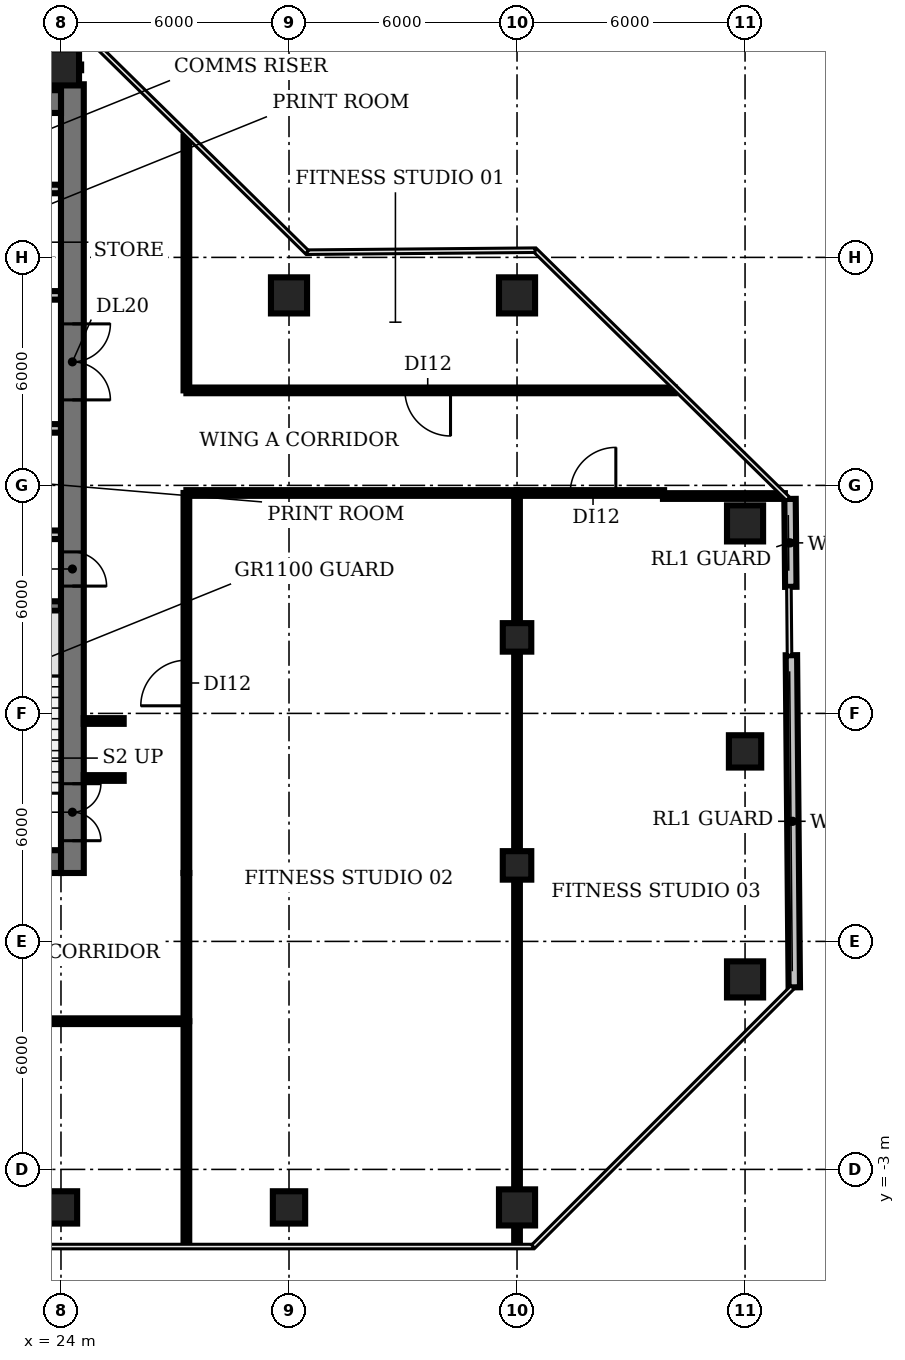
"""IFC4 building model, lengths in metres.
Left out: names, types, materials, properties, quantities, classifications, styles, units other than length and angle.
Written with IfcOpenShell. Run it as: python <this file> out.ifc"""

import sys

from ifc_helpers import new_model, si_unit, direction, frame, frame_2d, origin, origin_2d, place, context, subcontext, project, spatial, rectangle, circle, extrude, element, fill, save


model = new_model("IFC4")
c1 = context("Model", 3, precision=1e-05, world=origin(), true_north=direction((0.0, 1.0)))
c2 = subcontext(c1, "Body", "Model", "MODEL_VIEW")
j1 = project(units=[si_unit("LENGTHUNIT", "METRE"), si_unit("PLANEANGLEUNIT", "RADIAN")], contexts=[c1])
p1 = place(None, origin())
s1 = spatial("IfcSite", under=j1, at=p1, CompositionType="ELEMENT")
p2 = place(p1, origin())
s2 = spatial("IfcBuilding", under=s1, at=p2, CompositionType="ELEMENT")
p3 = place(p2, frame((0.0, 0.0, 171.8)))
s3 = spatial("IfcBuildingStorey", under=s2, at=p3, CompositionType="ELEMENT", Elevation=171.8)
p4 = place(p3, frame((24.0, -4.0, 0.0), z_axis=(0.0, 0.0, 1.0), x_axis=(1.0, 0.0, 0.0)))
e1 = element("IfcColumn", 1, at=p4, inside=s3, PredefinedType="COLUMN", context=c2, shape_type="SweptSolid", body=[
    extrude(rectangle(XDim=0.85, YDim=0.85, at=origin_2d()), origin(), (0.0, 0.0, 1.0), 3.85),
])
p5 = place(p3, frame((24.0, 26.0, 0.0), z_axis=(0.0, 0.0, 1.0), x_axis=(1.0, 0.0, 0.0)))
e2 = element("IfcColumn", 2, at=p5, inside=s3, PredefinedType="COLUMN", context=c2, shape_type="SweptSolid", body=[
    extrude(circle(Radius=0.475, at=origin_2d()), origin(), (0.0, 0.0, 1.0), 3.85),
])
p6 = place(p3, frame((30.0, -4.0, 0.0), z_axis=(0.0, 0.0, 1.0), x_axis=(1.0, 0.0, 0.0)))
e3 = element("IfcColumn", 3, at=p6, inside=s3, PredefinedType="COLUMN", context=c2, shape_type="SweptSolid", body=[
    extrude(rectangle(XDim=0.85, YDim=0.85, at=origin_2d()), origin(), (0.0, 0.0, 1.0), 3.85),
])
for number, where, z_axis, x_axis in (
    (4, (30.0, 20.0, 0.0), (0.0, 0.0, 1.0), (1.0, 0.0, 0.0)),
    (5, (36.0, -4.0, 0.0), (0.0, 0.0, 1.0), (1.0, 0.0, 0.0)),
):
    element("IfcColumn", number, at=place(p3, frame(where, z_axis=z_axis, x_axis=x_axis)), inside=s3, PredefinedType="COLUMN", context=c2, shape_type="SweptSolid", body=[
        extrude(circle(Radius=0.475, at=origin_2d()), origin(), (0.0, 0.0, 1.0), 3.85),
    ])
for number, where, z_axis, x_axis in (
    (6, (36.0, 5.0, 0.0), (0.0, 0.0, 1.0), (1.0, 0.0, 0.0)),
    (7, (36.0, 11.0, 0.0), (0.0, 0.0, 1.0), (1.0, 0.0, 0.0)),
):
    element("IfcColumn", number, at=place(p3, frame(where, z_axis=z_axis, x_axis=x_axis)), inside=s3, PredefinedType="COLUMN", context=c2, shape_type="SweptSolid", body=[
        extrude(rectangle(XDim=0.75, YDim=0.75, at=origin_2d()), origin(), (0.0, 0.0, 1.0), 3.85),
    ])
for number, where, z_axis, x_axis in (
    (8, (36.0, 20.0, 0.0), (0.0, 0.0, 1.0), (1.0, 0.0, 0.0)),
    (9, (42.0, 2.0, 0.0), (0.0, 0.0, 1.0), (1.0, 0.0, 0.0)),
):
    element("IfcColumn", number, at=place(p3, frame(where, z_axis=z_axis, x_axis=x_axis)), inside=s3, PredefinedType="COLUMN", context=c2, shape_type="SweptSolid", body=[
        extrude(circle(Radius=0.475, at=origin_2d()), origin(), (0.0, 0.0, 1.0), 3.85),
    ])
p7 = place(p3, frame((42.0, 8.0, 0.0), z_axis=(0.0, 0.0, 1.0), x_axis=(1.0, 0.0, 0.0)))
e10 = element("IfcColumn", 10, at=p7, inside=s3, PredefinedType="COLUMN", context=c2, shape_type="SweptSolid", body=[
    extrude(rectangle(XDim=0.85, YDim=0.85, at=origin_2d()), origin(), (0.0, 0.0, 1.0), 3.85),
])
p8 = place(p3, frame((42.0, 14.0, 0.0), z_axis=(0.0, 0.0, 1.0), x_axis=(1.0, 0.0, 0.0)))
e11 = element("IfcColumn", 11, at=p8, inside=s3, PredefinedType="COLUMN", context=c2, shape_type="SweptSolid", body=[
    extrude(circle(Radius=0.475, at=origin_2d()), origin(), (0.0, 0.0, 1.0), 3.85),
])
p9 = place(p3, frame((43.296, 1.791, 0.0), z_axis=(0.0, 0.0, 1.0), x_axis=(-0.008742926817, 0.999961779885, 0.0)))
e12 = element("IfcWall", 12, at=p9, inside=s3, PredefinedType="SOLIDWALL", context=c2, shape_type="SweptSolid", body=[
    extrude(rectangle(XDim=8.74, YDim=0.3, at=frame_2d((4.37, 0.0))), origin(), (0.0, 0.0, 1.0), 3.85),
])
p10 = place(p3, frame((43.204, 12.331, 0.0), z_axis=(0.0, 0.0, 1.0), x_axis=(-0.00875955838, 0.999961634333, 0.0)))
e13 = element("IfcWall", 13, at=p10, inside=s3, PredefinedType="SOLIDWALL", context=c2, shape_type="SweptSolid", body=[
    extrude(rectangle(XDim=2.313, YDim=0.3, at=frame_2d((1.157, 0.0))), origin(), (0.0, 0.0, 1.0), 3.85),
])
p11 = place(p3, frame((20.85, 11.825, 0.0), z_axis=(0.0, 0.0, 1.0), x_axis=(1.0, 0.0, 0.0)))
e14 = element("IfcWall", 14, at=p11, inside=s3, PredefinedType="SHEAR", context=c2, shape_type="SweptSolid", body=[
    extrude(rectangle(XDim=3.15, YDim=0.25, at=frame_2d((1.575, 0.0))), origin(), (0.0, 0.0, 1.0), 3.85),
])
p12 = place(p3, frame((16.6, 13.7, 0.0), z_axis=(0.0, 0.0, 1.0), x_axis=(1.0, 0.0, 0.0)))
e15 = element("IfcWall", 15, at=p12, inside=s3, PredefinedType="PARTITIONING", context=c2, shape_type="SweptSolid", body=[
    extrude(rectangle(XDim=7.4, YDim=0.225, at=frame_2d((3.7, 0.0))), origin(), (0.0, 0.0, 1.0), 3.85),
])
p13 = place(p3, frame((9.4, 16.5, 0.0), z_axis=(0.0, 0.0, 1.0), x_axis=(1.0, 0.0, 0.0)))
e16 = element("IfcWall", 16, at=p13, inside=s3, PredefinedType="PARTITIONING", context=c2, shape_type="SweptSolid", body=[
    extrude(rectangle(XDim=14.6, YDim=0.225, at=frame_2d((7.3, 0.0))), origin(), (0.0, 0.0, 1.0), 3.85),
])
p14 = place(p13, frame((0.55, 0.0, 0.0)))
e17 = element("IfcOpeningElement", 17, at=p14, cuts=e16, PredefinedType="OPENING", context=c2, shape_type="SweptSolid", body=[
    extrude(rectangle(XDim=0.9, YDim=2.1, at=frame_2d((0.45, 1.05))), frame((0.0, 0.123, 0.0), z_axis=(0.0, -1.0, 0.0), x_axis=(1.0, 0.0, 0.0)), (0.0, 0.0, 1.0), 0.245),
])
p15 = place(p13, frame((6.075, 0.0, 0.0)))
e18 = element("IfcOpeningElement", 18, at=p15, cuts=e16, PredefinedType="OPENING", context=c2, shape_type="SweptSolid", body=[
    extrude(rectangle(XDim=1.0, YDim=2.1, at=frame_2d((0.5, 1.05))), frame((0.0, 0.123, 0.0), z_axis=(0.0, -1.0, 0.0), x_axis=(1.0, 0.0, 0.0)), (0.0, 0.0, 1.0), 0.245),
])
p16 = place(p13, frame((11.308, 0.0, 0.0)))
e19 = element("IfcOpeningElement", 19, at=p16, cuts=e16, PredefinedType="OPENING", context=c2, shape_type="SweptSolid", body=[
    extrude(rectangle(XDim=0.9, YDim=2.1, at=frame_2d((0.45, 1.05))), frame((0.0, 0.123, 0.0), z_axis=(0.0, -1.0, 0.0), x_axis=(1.0, 0.0, 0.0)), (0.0, 0.0, 1.0), 0.245),
])
p17 = place(p13, frame((13.083, 0.0, 0.0)))
e20 = element("IfcOpeningElement", 20, at=p17, cuts=e16, PredefinedType="OPENING", context=c2, shape_type="SweptSolid", body=[
    extrude(rectangle(XDim=0.9, YDim=2.1, at=frame_2d((0.45, 1.05))), frame((0.0, 0.123, 0.0), z_axis=(0.0, -1.0, 0.0), x_axis=(1.0, 0.0, 0.0)), (0.0, 0.0, 1.0), 0.245),
])
p18 = place(p3, frame((24.0, 20.0, 0.0), z_axis=(0.0, 0.0, 1.0), x_axis=(-1.0, 0.0, 0.0)))
e21 = element("IfcWall", 21, at=p18, inside=s3, PredefinedType="PARTITIONING", context=c2, shape_type="SweptSolid", body=[
    extrude(rectangle(XDim=14.6, YDim=0.225, at=frame_2d((7.3, 0.0))), origin(), (0.0, 0.0, 1.0), 3.85),
])
p19 = place(p18, frame((12.75, 0.0, 0.0)))
e22 = element("IfcOpeningElement", 22, at=p19, cuts=e21, PredefinedType="OPENING", context=c2, shape_type="SweptSolid", body=[
    extrude(rectangle(XDim=1.1, YDim=2.1, at=frame_2d((0.55, 1.05))), frame((0.0, 0.123, 0.0), z_axis=(0.0, -1.0, 0.0), x_axis=(1.0, 0.0, 0.0)), (0.0, 0.0, 1.0), 0.245),
])
p20 = place(p18, frame((9.95, 0.0, 0.0)))
e23 = element("IfcOpeningElement", 23, at=p20, cuts=e21, PredefinedType="OPENING", context=c2, shape_type="SweptSolid", body=[
    extrude(rectangle(XDim=1.1, YDim=2.1, at=frame_2d((0.55, 1.05))), frame((0.0, 0.123, 0.0), z_axis=(0.0, -1.0, 0.0), x_axis=(1.0, 0.0, 0.0)), (0.0, 0.0, 1.0), 0.245),
])
p21 = place(p18, frame((7.15, 0.0, 0.0)))
e24 = element("IfcOpeningElement", 24, at=p21, cuts=e21, PredefinedType="OPENING", context=c2, shape_type="SweptSolid", body=[
    extrude(rectangle(XDim=1.1, YDim=2.1, at=frame_2d((0.55, 1.05))), frame((0.0, 0.123, 0.0), z_axis=(0.0, -1.0, 0.0), x_axis=(1.0, 0.0, 0.0)), (0.0, 0.0, 1.0), 0.245),
])
p22 = place(p18, frame((4.35, 0.0, 0.0)))
e25 = element("IfcOpeningElement", 25, at=p22, cuts=e21, PredefinedType="OPENING", context=c2, shape_type="SweptSolid", body=[
    extrude(rectangle(XDim=1.1, YDim=2.1, at=frame_2d((0.55, 1.05))), frame((0.0, 0.123, 0.0), z_axis=(0.0, -1.0, 0.0), x_axis=(1.0, 0.0, 0.0)), (0.0, 0.0, 1.0), 0.245),
])
p23 = place(p18, frame((2.308, 0.0, 0.0)))
e26 = element("IfcOpeningElement", 26, at=p23, cuts=e21, PredefinedType="OPENING", context=c2, shape_type="SweptSolid", body=[
    extrude(rectangle(XDim=0.9, YDim=2.1, at=frame_2d((0.45, 1.05))), frame((0.0, 0.123, 0.0), z_axis=(0.0, -1.0, 0.0), x_axis=(1.0, 0.0, 0.0)), (0.0, 0.0, 1.0), 0.245),
])
p24 = place(p18, frame((0.532, 0.0, 0.0)))
e27 = element("IfcOpeningElement", 27, at=p24, cuts=e21, PredefinedType="OPENING", context=c2, shape_type="SweptSolid", body=[
    extrude(rectangle(XDim=0.9, YDim=2.1, at=frame_2d((0.45, 1.05))), frame((0.0, 0.123, 0.0), z_axis=(0.0, -1.0, 0.0), x_axis=(1.0, 0.0, 0.0)), (0.0, 0.0, 1.0), 0.245),
])
p25 = place(p3, frame((9.4, 22.8, 0.0), z_axis=(0.0, 0.0, 1.0), x_axis=(1.0, 0.0, 0.0)))
e28 = element("IfcWall", 28, at=p25, inside=s3, PredefinedType="PARTITIONING", context=c2, shape_type="SweptSolid", body=[
    extrude(rectangle(XDim=14.6, YDim=0.225, at=frame_2d((7.3, 0.0))), origin(), (0.0, 0.0, 1.0), 3.85),
])
p26 = place(p3, frame((24.3, 25.555, 0.0), z_axis=(0.0, 0.0, 1.0), x_axis=(0.0, -1.0, 0.0)))
e29 = element("IfcWall", 29, at=p26, inside=s3, PredefinedType="SHEAR", context=c2, shape_type="SweptSolid", body=[
    extrude(rectangle(XDim=20.755, YDim=0.6, at=frame_2d((10.377, 0.0))), origin(), (0.0, 0.0, 1.0), 3.85),
])
p27 = place(p26, frame((18.405, 0.0, 0.0)))
e30 = element("IfcOpeningElement", 30, at=p27, cuts=e29, PredefinedType="OPENING", context=c2, shape_type="SweptSolid", body=[
    extrude(rectangle(XDim=1.5, YDim=2.1, at=frame_2d((0.75, 1.05))), frame((0.0, 0.31, 0.0), z_axis=(0.0, -1.0, 0.0), x_axis=(1.0, 0.0, 0.0)), (0.0, 0.0, 1.0), 0.62),
])
p28 = place(p26, frame((12.305, 0.0, 0.0)))
e31 = element("IfcOpeningElement", 31, at=p28, cuts=e29, PredefinedType="OPENING", context=c2, shape_type="SweptSolid", body=[
    extrude(rectangle(XDim=0.9, YDim=2.1, at=frame_2d((0.45, 1.05))), frame((0.0, 0.31, 0.0), z_axis=(0.0, -1.0, 0.0), x_axis=(1.0, 0.0, 0.0)), (0.0, 0.0, 1.0), 0.62),
])
p29 = place(p26, frame((6.305, 0.0, 0.0)))
e32 = element("IfcOpeningElement", 32, at=p29, cuts=e29, PredefinedType="OPENING", context=c2, shape_type="SweptSolid", body=[
    extrude(rectangle(XDim=2.0, YDim=2.1, at=frame_2d((1.0, 1.05))), frame((0.0, 0.31, 0.0), z_axis=(0.0, -1.0, 0.0), x_axis=(1.0, 0.0, 0.0)), (0.0, 0.0, 1.0), 0.62),
])
p30 = place(p3, frame((24.0, 5.1, 0.0), z_axis=(0.0, 0.0, 1.0), x_axis=(-1.0, 0.0, 0.0)))
e33 = element("IfcWall", 33, at=p30, inside=s3, PredefinedType="SHEAR", context=c2, shape_type="SweptSolid", body=[
    extrude(rectangle(XDim=18.0, YDim=0.6, at=frame_2d((9.0, 0.0))), origin(), (0.0, 0.0, 1.0), 3.85),
])
p31 = place(p30, frame((13.0, 0.0, 0.0)))
e34 = element("IfcOpeningElement", 34, at=p31, cuts=e33, PredefinedType="OPENING", context=c2, shape_type="SweptSolid", body=[
    extrude(rectangle(XDim=1.2, YDim=2.1, at=frame_2d((0.6, 1.05))), frame((0.0, 0.31, 0.0), z_axis=(0.0, -1.0, 0.0), x_axis=(1.0, 0.0, 0.0)), (0.0, 0.0, 1.0), 0.62),
])
p32 = place(p30, frame((4.9, 0.0, 0.0)))
e35 = element("IfcOpeningElement", 35, at=p32, cuts=e33, PredefinedType="OPENING", context=c2, shape_type="SweptSolid", body=[
    extrude(rectangle(XDim=1.0, YDim=2.1, at=frame_2d((0.5, 1.05))), frame((0.0, 0.31, 0.0), z_axis=(0.0, -1.0, 0.0), x_axis=(1.0, 0.0, 0.0)), (0.0, 0.0, 1.0), 0.62),
])
p33 = place(p3, frame((6.0, 25.1, 0.0), z_axis=(0.0, 0.0, 1.0), x_axis=(1.0, 0.0, 0.0)))
e36 = element("IfcWall", 36, at=p33, inside=s3, PredefinedType="SHEAR", context=c2, shape_type="SweptSolid", body=[
    extrude(rectangle(XDim=18.0, YDim=0.6, at=frame_2d((9.0, 0.0))), origin(), (0.0, 0.0, 1.0), 3.85),
])
p34 = place(p3, frame((23.48, 26.0, 0.0), z_axis=(0.0, 0.0, 1.0), x_axis=(1.0, 0.0, 0.0)))
e37 = element("IfcWall", 37, at=p34, inside=s3, PredefinedType="PARTITIONING", context=c2, shape_type="SweptSolid", body=[
    extrude(rectangle(XDim=1.05, YDim=0.15, at=frame_2d((0.525, 0.0))), origin(), (0.0, 0.0, 1.0), 2.88),
])
for number, where, z_axis, x_axis in (
    (38, (24.6, 7.3, 0.0), (0.0, 0.0, 1.0), (1.0, 0.0, 0.0)),
    (39, (24.6, 8.8, 0.0), (0.0, 0.0, 1.0), (1.0, 0.0, 0.0)),
):
    element("IfcWall", number, at=place(p3, frame(where, z_axis=z_axis, x_axis=x_axis)), inside=s3, PredefinedType="PARTITIONING", context=c2, shape_type="SweptSolid", body=[
        extrude(rectangle(XDim=1.05, YDim=0.15, at=frame_2d((0.525, 0.0))), origin(), (0.0, 0.0, 1.0), 2.88),
    ])
p35 = place(p3, frame((27.3, -4.98, 0.0), z_axis=(0.0, 0.0, 1.0), x_axis=(0.0, 1.0, 0.0)))
e40 = element("IfcWall", 40, at=p35, inside=s3, PredefinedType="PARTITIONING", context=c2, shape_type="SweptSolid", body=[
    extrude(rectangle(XDim=5.88, YDim=0.15, at=frame_2d((2.94, 0.0))), origin(), (0.0, 0.0, 1.0), 2.88),
])
p36 = place(p3, frame((27.3, 0.9, 0.0), z_axis=(0.0, 0.0, 1.0), x_axis=(-1.0, 0.0, 0.0)))
e41 = element("IfcWall", 41, at=p36, inside=s3, PredefinedType="PARTITIONING", context=c2, shape_type="SweptSolid", body=[
    extrude(rectangle(XDim=24.6, YDim=0.15, at=frame_2d((12.3, 0.0))), origin(), (0.0, 0.0, 1.0), 2.88),
])
p37 = place(p36, frame((11.8, 0.0, 0.0)))
e42 = element("IfcOpeningElement", 42, at=p37, cuts=e41, PredefinedType="OPENING", context=c2, shape_type="SweptSolid", body=[
    extrude(rectangle(XDim=1.2, YDim=2.1, at=frame_2d((0.6, 1.05))), frame((0.0, 0.085, 0.0), z_axis=(0.0, -1.0, 0.0), x_axis=(1.0, 0.0, 0.0)), (0.0, 0.0, 1.0), 0.17),
])
p38 = place(p3, frame((27.3, 0.9, 0.0), z_axis=(0.0, 0.0, 1.0), x_axis=(0.0, 1.0, 0.0)))
e43 = element("IfcWall", 43, at=p38, inside=s3, PredefinedType="PARTITIONING", context=c2, shape_type="SweptSolid", body=[
    extrude(rectangle(XDim=3.9, YDim=0.15, at=frame_2d((1.95, 0.0))), origin(), (0.0, 0.0, 1.0), 2.88),
])
p39 = place(p3, frame((27.3, 4.8, 0.0), z_axis=(0.0, 0.0, 1.0), x_axis=(0.0, 1.0, 0.0)))
e44 = element("IfcWall", 44, at=p39, inside=s3, PredefinedType="PARTITIONING", context=c2, shape_type="SweptSolid", body=[
    extrude(rectangle(XDim=10.0, YDim=0.15, at=frame_2d((5.0, 0.0))), origin(), (0.0, 0.0, 1.0), 2.88),
])
p40 = place(p39, frame((4.4, 0.0, 0.0)))
e45 = element("IfcOpeningElement", 45, at=p40, cuts=e44, PredefinedType="OPENING", context=c2, shape_type="SweptSolid", body=[
    extrude(rectangle(XDim=1.2, YDim=2.1, at=frame_2d((0.6, 1.05))), frame((0.0, 0.085, 0.0), z_axis=(0.0, -1.0, 0.0), x_axis=(1.0, 0.0, 0.0)), (0.0, 0.0, 1.0), 0.17),
])
p41 = place(p3, frame((27.3, 14.8, 0.0), z_axis=(0.0, 0.0, 1.0), x_axis=(1.0, 0.0, 0.0)))
e46 = element("IfcWall", 46, at=p41, inside=s3, PredefinedType="PARTITIONING", context=c2, shape_type="SweptSolid", body=[
    extrude(rectangle(XDim=8.7, YDim=0.15, at=frame_2d((4.35, 0.0))), origin(), (0.0, 0.0, 1.0), 2.88),
])
p42 = place(p3, frame((27.3, 17.5, 0.0), z_axis=(0.0, 0.0, 1.0), x_axis=(0.0, 1.0, 0.0)))
e47 = element("IfcWall", 47, at=p42, inside=s3, PredefinedType="PARTITIONING", context=c2, shape_type="SweptSolid", body=[
    extrude(rectangle(XDim=6.68, YDim=0.15, at=frame_2d((3.34, 0.0))), origin(), (0.0, 0.0, 1.0), 2.88),
])
p43 = place(p3, frame((36.0, -4.98, 0.0), z_axis=(0.0, 0.0, 1.0), x_axis=(0.0, 1.0, 0.0)))
e48 = element("IfcWall", 48, at=p43, inside=s3, PredefinedType="PARTITIONING", context=c2, shape_type="SweptSolid", body=[
    extrude(rectangle(XDim=19.78, YDim=0.15, at=frame_2d((9.89, 0.0))), origin(), (0.0, 0.0, 1.0), 2.88),
])
p44 = place(p3, frame((36.0, 14.8, 0.0), z_axis=(0.0, 0.0, 1.0), x_axis=(1.0, 0.0, 0.0)))
e49 = element("IfcWall", 49, at=p44, inside=s3, PredefinedType="PARTITIONING", context=c2, shape_type="SweptSolid", body=[
    extrude(rectangle(XDim=3.87, YDim=0.15, at=frame_2d((1.935, 0.0))), origin(), (0.0, 0.0, 1.0), 2.88),
])
p45 = place(p44, frame((1.4, 0.0, 0.0)))
e50 = element("IfcOpeningElement", 50, at=p45, cuts=e49, PredefinedType="OPENING", context=c2, shape_type="SweptSolid", body=[
    extrude(rectangle(XDim=1.2, YDim=2.1, at=frame_2d((0.6, 1.05))), frame((0.0, 0.085, 0.0), z_axis=(0.0, -1.0, 0.0), x_axis=(1.0, 0.0, 0.0)), (0.0, 0.0, 1.0), 0.17),
])
p46 = place(p3, frame((39.84, 14.72, 0.0), z_axis=(0.0, 0.0, 1.0), x_axis=(1.0, 0.0, 0.0)))
e51 = element("IfcWall", 51, at=p46, inside=s3, PredefinedType="PARTITIONING", context=c2, shape_type="SweptSolid", body=[
    extrude(rectangle(XDim=3.208, YDim=0.15, at=frame_2d((1.604, 0.0))), origin(), (0.0, 0.0, 1.0), 2.88),
])
p47 = place(p3, frame((40.15, 17.5, 0.0), z_axis=(0.0, 0.0, 1.0), x_axis=(-1.0, 0.0, 0.0)))
e52 = element("IfcWall", 52, at=p47, inside=s3, PredefinedType="PARTITIONING", context=c2, shape_type="SweptSolid", body=[
    extrude(rectangle(XDim=12.85, YDim=0.15, at=frame_2d((6.425, 0.0))), origin(), (0.0, 0.0, 1.0), 2.88),
])
p48 = place(p47, frame((5.9, 0.0, 0.0)))
e53 = element("IfcOpeningElement", 53, at=p48, cuts=e52, PredefinedType="OPENING", context=c2, shape_type="SweptSolid", body=[
    extrude(rectangle(XDim=1.2, YDim=2.1, at=frame_2d((0.6, 1.05))), frame((0.0, 0.085, 0.0), z_axis=(0.0, -1.0, 0.0), x_axis=(1.0, 0.0, 0.0)), (0.0, 0.0, 1.0), 0.17),
])
p49 = place(p27, origin())
e54 = element("IfcDoor", 54, at=p49, inside=s3, OperationType="DOUBLE_DOOR_SINGLE_SWING", PredefinedType="DOOR", context=c2, shape_type="SweptSolid", body=[
    extrude(rectangle(XDim=1.5, YDim=2.1, at=frame_2d((0.75, 1.05))), frame((0.0, 0.025, 0.0), z_axis=(0.0, -1.0, 0.0), x_axis=(1.0, 0.0, 0.0)), (0.0, 0.0, 1.0), 0.05),
])
fill(e30, e54)
p50 = place(p28, origin())
e55 = element("IfcDoor", 55, at=p50, inside=s3, OperationType="SINGLE_SWING_RIGHT", PredefinedType="DOOR", context=c2, shape_type="SweptSolid", body=[
    extrude(rectangle(XDim=0.9, YDim=2.1, at=frame_2d((0.45, 1.05))), frame((0.0, -0.24, 0.0), z_axis=(0.0, -1.0, 0.0), x_axis=(1.0, 0.0, 0.0)), (0.0, 0.0, 1.0), 0.05),
])
fill(e31, e55)
p51 = place(p29, origin())
e56 = element("IfcDoor", 56, at=p51, inside=s3, OperationType="DOUBLE_DOOR_SINGLE_SWING", PredefinedType="DOOR", context=c2, shape_type="SweptSolid", body=[
    extrude(rectangle(XDim=2.0, YDim=2.1, at=frame_2d((1.0, 1.05))), frame((0.0, 0.025, 0.0), z_axis=(0.0, -1.0, 0.0), x_axis=(1.0, 0.0, 0.0)), (0.0, 0.0, 1.0), 0.05),
])
fill(e32, e56)
p52 = place(p40, origin())
e57 = element("IfcDoor", 57, at=p52, inside=s3, OperationType="SINGLE_SWING_LEFT", PredefinedType="DOOR", context=c2, shape_type="SweptSolid", body=[
    extrude(rectangle(XDim=1.2, YDim=2.1, at=frame_2d((0.6, 1.05))), frame((0.0, 0.025, 0.0), z_axis=(0.0, -1.0, 0.0), x_axis=(1.0, 0.0, 0.0)), (0.0, 0.0, 1.0), 0.05),
])
fill(e45, e57)
p53 = place(p45, origin())
e58 = element("IfcDoor", 58, at=p53, inside=s3, OperationType="SINGLE_SWING_RIGHT", PredefinedType="DOOR", context=c2, shape_type="SweptSolid", body=[
    extrude(rectangle(XDim=1.2, YDim=2.1, at=frame_2d((0.6, 1.05))), frame((0.0, 0.025, 0.0), z_axis=(0.0, -1.0, 0.0), x_axis=(1.0, 0.0, 0.0)), (0.0, 0.0, 1.0), 0.05),
])
fill(e50, e58)
p54 = place(p48, origin())
e59 = element("IfcDoor", 59, at=p54, inside=s3, OperationType="SINGLE_SWING_LEFT", PredefinedType="DOOR", context=c2, shape_type="SweptSolid", body=[
    extrude(rectangle(XDim=1.2, YDim=2.1, at=frame_2d((0.6, 1.05))), frame((0.0, 0.025, 0.0), z_axis=(0.0, -1.0, 0.0), x_axis=(1.0, 0.0, 0.0)), (0.0, 0.0, 1.0), 0.05),
])
fill(e53, e59)
save(model, sys.argv[1])
